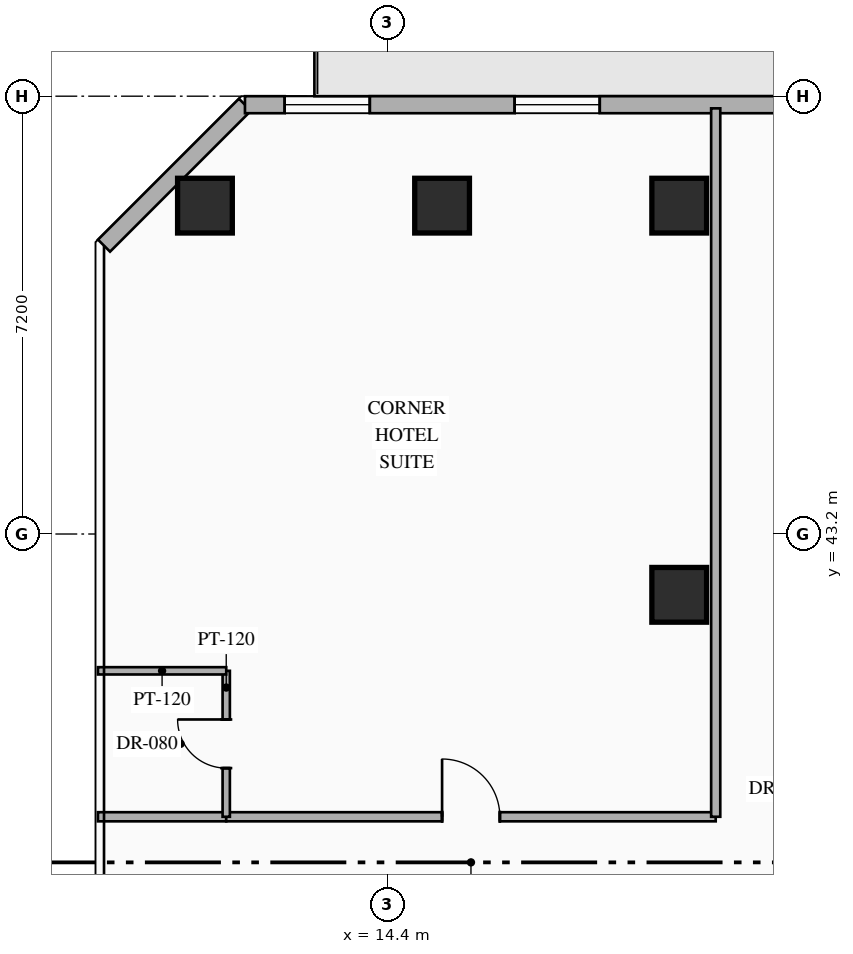
"""IFC4 building model, lengths in metres.
Left out: names, types, materials, properties, quantities, classifications, styles, units other than length and angle.
Written with IfcOpenShell. Run it as: python <this file> out.ifc"""

import sys

from ifc_helpers import new_model, si_unit, direction, frame, frame_2d, origin, origin_2d, place, context, subcontext, project, spatial, rectangle, hollow_rectangle, extrude, element, fill, save


model = new_model("IFC4")
c1 = context("Model", 3, precision=1e-05, world=origin(), true_north=direction((0.0, 1.0)))
c2 = subcontext(c1, "Body", "Model", "MODEL_VIEW")
j1 = project(units=[si_unit("LENGTHUNIT", "METRE"), si_unit("PLANEANGLEUNIT", "RADIAN")], contexts=[c1])
p1 = place(None, origin())
s1 = spatial("IfcSite", under=j1, at=p1, CompositionType="ELEMENT")
p2 = place(p1, origin())
s2 = spatial("IfcBuilding", under=s1, at=p2, CompositionType="ELEMENT")
p3 = place(p2, frame((0.0, 0.0, 84.65)))
s3 = spatial("IfcBuildingStorey", under=s2, at=p3, CompositionType="ELEMENT", Elevation=84.65)
for number, where, z_axis, x_axis in (
    (1, (11.4, 48.6, 0.0), (0.0, 0.0, 1.0), (1.0, 0.0, 0.0)),
    (2, (19.2, 48.6, 0.0), (0.0, 0.0, 1.0), (1.0, 0.0, 0.0)),
    (3, (19.2, 42.2, 0.0), (0.0, 0.0, 1.0), (1.0, 0.0, 0.0)),
    (4, (15.3, 48.6, 0.0), (0.0, 0.0, 1.0), (1.0, 0.0, 0.0)),
):
    element("IfcColumn", number, at=place(p3, frame(where, z_axis=z_axis, x_axis=x_axis)), inside=s3, PredefinedType="COLUMN", context=c2, shape_type="SweptSolid", body=[
        extrude(hollow_rectangle(XDim=0.9, YDim=0.9, WallThickness=0.036, at=origin_2d()), origin(), (0.0, 0.0, 1.0), 3.35),
    ])
p4 = place(p3, frame((9.74, 47.942, 0.0), z_axis=(0.0, 0.0, 1.0), x_axis=(0.707106781187, 0.707106781187, 0.0)))
e5 = element("IfcWall", 5, at=p4, inside=s3, PredefinedType="STANDARD", context=c2, shape_type="SweptSolid", body=[
    extrude(rectangle(XDim=3.278, YDim=0.28, at=frame_2d((1.639, 0.0))), origin(), (0.0, 0.0, 1.0), 3.13),
])
p5 = place(p3, frame((12.058, 50.26, 0.0), z_axis=(0.0, 0.0, 1.0), x_axis=(1.0, 0.0, 0.0)))
e6 = element("IfcWall", 6, at=p5, inside=s3, PredefinedType="STANDARD", context=c2, shape_type="SweptSolid", body=[
    extrude(rectangle(XDim=30.484, YDim=0.28, at=frame_2d((15.242, 0.0))), origin(), (0.0, 0.0, 1.0), 3.13),
])
p6 = place(p5, frame((14.992, 0.0, 0.0)))
e7 = element("IfcOpeningElement", 7, at=p6, cuts=e6, PredefinedType="OPENING", context=c2, shape_type="SweptSolid", body=[
    extrude(rectangle(XDim=1.1, YDim=2.2, at=frame_2d((0.55, 1.1))), frame((0.0, 0.15, 0.0), z_axis=(0.0, -1.0, 0.0), x_axis=(1.0, 0.0, 0.0)), (0.0, 0.0, 1.0), 0.3),
])
p7 = place(p5, frame((0.653, 0.0, 0.85)))
e8 = element("IfcOpeningElement", 8, at=p7, cuts=e6, PredefinedType="OPENING", context=c2, shape_type="SweptSolid", body=[
    extrude(rectangle(XDim=1.4, YDim=1.8, at=frame_2d((0.7, 0.9))), frame((0.0, 0.15, 0.0), z_axis=(0.0, -1.0, 0.0), x_axis=(1.0, 0.0, 0.0)), (0.0, 0.0, 1.0), 0.3),
])
p8 = place(p5, frame((4.435, 0.0, 0.85)))
e9 = element("IfcOpeningElement", 9, at=p8, cuts=e6, PredefinedType="OPENING", context=c2, shape_type="SweptSolid", body=[
    extrude(rectangle(XDim=1.4, YDim=1.8, at=frame_2d((0.7, 0.9))), frame((0.0, 0.15, 0.0), z_axis=(0.0, -1.0, 0.0), x_axis=(1.0, 0.0, 0.0)), (0.0, 0.0, 1.0), 0.3),
])
p9 = place(p5, frame((11.361, 0.0, 0.85)))
e10 = element("IfcOpeningElement", 10, at=p9, cuts=e6, PredefinedType="OPENING", context=c2, shape_type="SweptSolid", body=[
    extrude(rectangle(XDim=1.4, YDim=1.8, at=frame_2d((0.7, 0.9))), frame((0.0, 0.15, 0.0), z_axis=(0.0, -1.0, 0.0), x_axis=(1.0, 0.0, 0.0)), (0.0, 0.0, 1.0), 0.3),
])
p10 = place(p5, frame((19.693, 0.0, 0.85)))
e11 = element("IfcOpeningElement", 11, at=p10, cuts=e6, PredefinedType="OPENING", context=c2, shape_type="SweptSolid", body=[
    extrude(rectangle(XDim=1.4, YDim=1.8, at=frame_2d((0.7, 0.9))), frame((0.0, 0.15, 0.0), z_axis=(0.0, -1.0, 0.0), x_axis=(1.0, 0.0, 0.0)), (0.0, 0.0, 1.0), 0.3),
])
p11 = place(p5, frame((23.252, 0.0, 0.85)))
e12 = element("IfcOpeningElement", 12, at=p11, cuts=e6, PredefinedType="OPENING", context=c2, shape_type="SweptSolid", body=[
    extrude(rectangle(XDim=1.4, YDim=1.8, at=frame_2d((0.7, 0.9))), frame((0.0, 0.15, 0.0), z_axis=(0.0, -1.0, 0.0), x_axis=(1.0, 0.0, 0.0)), (0.0, 0.0, 1.0), 0.3),
])
p12 = place(p5, frame((27.417, 0.0, 0.85)))
e13 = element("IfcOpeningElement", 13, at=p12, cuts=e6, PredefinedType="OPENING", context=c2, shape_type="SweptSolid", body=[
    extrude(rectangle(XDim=1.4, YDim=1.8, at=frame_2d((0.7, 0.9))), frame((0.0, 0.15, 0.0), z_axis=(0.0, -1.0, 0.0), x_axis=(1.0, 0.0, 0.0)), (0.0, 0.0, 1.0), 0.3),
])
p13 = place(p3, frame((9.64, 38.55, 0.0), z_axis=(0.0, 0.0, 1.0), x_axis=(1.0, 0.0, 0.0)))
e14 = element("IfcWall", 14, at=p13, inside=s3, PredefinedType="PARTITIONING", context=c2, shape_type="SweptSolid", body=[
    extrude(rectangle(XDim=2.11, YDim=0.15, at=frame_2d((1.055, 0.0))), origin(), (0.0, 0.0, 1.0), 2.775),
])
p14 = place(p3, frame((11.75, 38.55, 0.0), z_axis=(0.0, 0.0, 1.0), x_axis=(1.0, 0.0, 0.0)))
e15 = element("IfcWall", 15, at=p14, inside=s3, PredefinedType="PARTITIONING", context=c2, shape_type="SweptSolid", body=[
    extrude(rectangle(XDim=8.05, YDim=0.15, at=frame_2d((4.025, 0.0))), origin(), (0.0, 0.0, 1.0), 2.775),
])
p15 = place(p14, frame((3.55, 0.0, 0.0)))
e16 = element("IfcOpeningElement", 16, at=p15, cuts=e15, PredefinedType="OPENING", context=c2, shape_type="SweptSolid", body=[
    extrude(rectangle(XDim=0.95, YDim=2.15, at=frame_2d((0.475, 1.075))), frame((0.0, 0.085, 0.0), z_axis=(0.0, -1.0, 0.0), x_axis=(1.0, 0.0, 0.0)), (0.0, 0.0, 1.0), 0.17),
])
p16 = place(p3, frame((11.75, 38.55, 0.0), z_axis=(0.0, 0.0, 1.0), x_axis=(0.0, 1.0, 0.0)))
e17 = element("IfcWall", 17, at=p16, inside=s3, PredefinedType="PARTITIONING", context=c2, shape_type="SweptSolid", body=[
    extrude(rectangle(XDim=2.4, YDim=0.12, at=frame_2d((1.2, 0.0))), origin(), (0.0, 0.0, 1.0), 3.13),
])
p17 = place(p16, frame((0.8, 0.0, 0.0)))
e18 = element("IfcOpeningElement", 18, at=p17, cuts=e17, PredefinedType="OPENING", context=c2, shape_type="SweptSolid", body=[
    extrude(rectangle(XDim=0.8, YDim=2.06, at=frame_2d((0.4, 1.03))), frame((0.0, 0.07, 0.0), z_axis=(0.0, -1.0, 0.0), x_axis=(1.0, 0.0, 0.0)), (0.0, 0.0, 1.0), 0.14),
])
p18 = place(p3, frame((9.64, 40.95, 0.0), z_axis=(0.0, 0.0, 1.0), x_axis=(1.0, 0.0, 0.0)))
e19 = element("IfcWall", 19, at=p18, inside=s3, PredefinedType="PARTITIONING", context=c2, shape_type="SweptSolid", body=[
    extrude(rectangle(XDim=2.11, YDim=0.12, at=frame_2d((1.055, 0.0))), origin(), (0.0, 0.0, 1.0), 2.775),
])
p19 = place(p3, frame((19.8, 38.55, 0.0), z_axis=(0.0, 0.0, 1.0), x_axis=(0.0, 1.0, 0.0)))
e20 = element("IfcWall", 20, at=p19, inside=s3, PredefinedType="PARTITIONING", context=c2, shape_type="SweptSolid", body=[
    extrude(rectangle(XDim=11.65, YDim=0.15, at=frame_2d((5.825, 0.0))), origin(), (0.0, 0.0, 1.0), 3.13),
])
p20 = place(p7, origin())
e21 = element("IfcWindow", 21, at=p20, inside=s3, PartitioningType="SINGLE_PANEL", PredefinedType="WINDOW", context=c2, shape_type="SweptSolid", body=[
    extrude(rectangle(XDim=1.4, YDim=1.8, at=frame_2d((0.7, 0.9))), frame((0.0, 0.03, 0.0), z_axis=(0.0, -1.0, 0.0), x_axis=(1.0, 0.0, 0.0)), (0.0, 0.0, 1.0), 0.06),
])
fill(e8, e21)
p21 = place(p8, origin())
e22 = element("IfcWindow", 22, at=p21, inside=s3, PartitioningType="SINGLE_PANEL", PredefinedType="WINDOW", context=c2, shape_type="SweptSolid", body=[
    extrude(rectangle(XDim=1.4, YDim=1.8, at=frame_2d((0.7, 0.9))), frame((0.0, 0.03, 0.0), z_axis=(0.0, -1.0, 0.0), x_axis=(1.0, 0.0, 0.0)), (0.0, 0.0, 1.0), 0.06),
])
fill(e9, e22)
p22 = place(p15, origin())
e23 = element("IfcDoor", 23, at=p22, inside=s3, OperationType="SINGLE_SWING_LEFT", PredefinedType="DOOR", context=c2, shape_type="SweptSolid", body=[
    extrude(rectangle(XDim=0.95, YDim=2.15, at=frame_2d((0.475, 1.075))), frame((0.0, 0.025, 0.0), z_axis=(0.0, -1.0, 0.0), x_axis=(1.0, 0.0, 0.0)), (0.0, 0.0, 1.0), 0.05),
])
fill(e16, e23)
p23 = place(p17, origin())
e24 = element("IfcDoor", 24, at=p23, inside=s3, OperationType="SINGLE_SWING_RIGHT", PredefinedType="DOOR", context=c2, shape_type="SweptSolid", body=[
    extrude(rectangle(XDim=0.8, YDim=2.06, at=frame_2d((0.4, 1.03))), frame((0.0, 0.025, 0.0), z_axis=(0.0, -1.0, 0.0), x_axis=(1.0, 0.0, 0.0)), (0.0, 0.0, 1.0), 0.05),
])
fill(e18, e24)
save(model, sys.argv[1])
